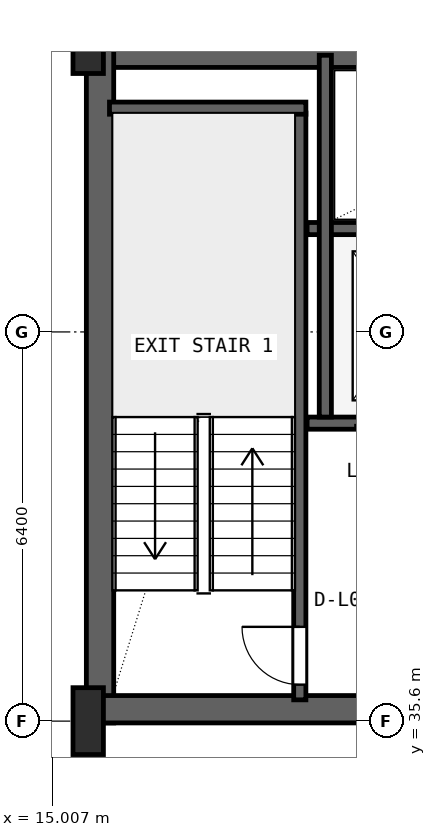
"""IFC4 building model, lengths in metres.
Left out: names, types, materials, properties, quantities, classifications, styles, units other than length and angle.
Written with IfcOpenShell. Run it as: python <this file> out.ifc"""

import sys

from ifc_helpers import new_model, si_unit, direction, frame, frame_2d, origin, origin_2d, place, context, subcontext, project, spatial, rectangle, i_section, extrude, source, transform, mapped, element, fill, save


model = new_model("IFC4")
c1 = context("Model", 3, precision=1e-05, world=origin(), true_north=direction((0.0, 1.0)))
c2 = subcontext(c1, "Body", "Model", "MODEL_VIEW")
j1 = project(units=[si_unit("LENGTHUNIT", "METRE"), si_unit("PLANEANGLEUNIT", "RADIAN")], contexts=[c1])
p1 = place(None, origin())
s1 = spatial("IfcSite", under=j1, at=p1, CompositionType="ELEMENT")
p2 = place(p1, origin())
s2 = spatial("IfcBuilding", under=s1, at=p2, CompositionType="ELEMENT")
p3 = place(p2, frame((0.0, 0.0, 43.2)))
s3 = spatial("IfcBuildingStorey", under=s2, at=p3, CompositionType="ELEMENT", Elevation=43.2)
p4 = place(p3, frame((15.6, 46.575, 0.0), z_axis=(0.0, 0.0, 1.0), x_axis=(1.0, 0.0, 0.0)))
e1 = element("IfcWall", 1, at=p4, inside=s3, PredefinedType="SHEAR", context=c2, shape_type="SweptSolid", body=[
    extrude(rectangle(XDim=36.8, YDim=0.45, at=frame_2d((18.4, 0.0))), origin(), (0.0, 0.0, 1.0), 3.65),
])
p5 = place(p3, frame((15.795, 35.57, 0.0), z_axis=(0.0, 0.0, 1.0), x_axis=(0.0, 1.0, 0.0)))
e2 = element("IfcWall", 2, at=p5, inside=s3, PredefinedType="SHEAR", context=c2, shape_type="SweptSolid", body=[
    extrude(rectangle(XDim=11.23, YDim=0.45, at=frame_2d((5.615, 0.0))), origin(), (0.0, 0.0, 1.0), 3.65),
])
p6 = place(p3, frame((15.57, 35.795, 0.0), z_axis=(0.0, 0.0, 1.0), x_axis=(1.0, 0.0, 0.0)))
e3 = element("IfcWall", 3, at=p6, inside=s3, PredefinedType="SHEAR", context=c2, shape_type="SweptSolid", body=[
    extrude(rectangle(XDim=9.23, YDim=0.45, at=frame_2d((4.615, 0.0))), origin(), (0.0, 0.0, 1.0), 3.65),
])
p7 = place(p6, frame((5.4, 0.0, 0.0)))
e4 = element("IfcOpeningElement", 4, at=p7, cuts=e3, PredefinedType="OPENING", context=c2, shape_type="SweptSolid", body=[
    extrude(rectangle(XDim=1.0, YDim=2.1, at=frame_2d((0.5, 1.05))), frame((0.0, 0.235, 0.0), z_axis=(0.0, -1.0, 0.0), x_axis=(1.0, 0.0, 0.0)), (0.0, 0.0, 1.0), 0.47),
])
m1 = source(origin(), c2, "Body", "SweptSolid", [
    extrude(i_section(OverallWidth=0.5, OverallDepth=1.1, WebThickness=0.018, FlangeThickness=0.032, FilletRadius=0.018, at=origin_2d()), origin(), (0.0, 0.0, 1.0), 3.9),
])
for number, where, z_axis, x_axis in (
    (5, (15.6, 35.6, 0.0), (0.0, 0.0, 1.0), (1.0, 0.0, 0.0)),
    (6, (15.6, 46.8, 0.0), (0.0, 0.0, 1.0), (1.0, 0.0, 0.0)),
):
    element("IfcColumn", number, at=place(p3, frame(where, z_axis=z_axis, x_axis=x_axis)), inside=s3, PredefinedType="COLUMN", context=c2, shape_type="MappedRepresentation", body=[
        mapped(m1, transform((0.0, 0.0, 0.0), x_axis=(1.0, 0.0, 0.0), y_axis=(0.0, 1.0, 0.0), z_axis=(0.0, 0.0, 1.0), scale=1.0)),
    ])
p8 = place(p3, frame((19.08, 35.95, 0.0), z_axis=(0.0, 0.0, 1.0), x_axis=(0.0, 1.0, 0.0)))
e7 = element("IfcWall", 7, at=p8, inside=s3, PredefinedType="SHEAR", context=c2, shape_type="SweptSolid", body=[
    extrude(rectangle(XDim=9.65, YDim=0.2, at=frame_2d((4.825, 0.0))), origin(), (0.0, 0.0, 1.0), 3.65),
])
p9 = place(p8, frame((0.25, 0.0, 0.0)))
e8 = element("IfcOpeningElement", 8, at=p9, cuts=e7, PredefinedType="OPENING", context=c2, shape_type="SweptSolid", body=[
    extrude(rectangle(XDim=0.95, YDim=2.1, at=frame_2d((0.475, 1.05))), frame((0.0, 0.11, 0.0), z_axis=(0.0, -1.0, 0.0), x_axis=(1.0, 0.0, 0.0)), (0.0, 0.0, 1.0), 0.22),
])
p10 = place(p3, frame((15.95, 45.68, 0.0), z_axis=(0.0, 0.0, 1.0), x_axis=(1.0, 0.0, 0.0)))
e9 = element("IfcWall", 9, at=p10, inside=s3, PredefinedType="SHEAR", context=c2, shape_type="SweptSolid", body=[
    extrude(rectangle(XDim=3.23, YDim=0.2, at=frame_2d((1.615, 0.0))), origin(), (0.0, 0.0, 1.0), 3.65),
])
p11 = place(p3, frame((19.2, 40.5, 0.0), z_axis=(0.0, 0.0, 1.0), x_axis=(1.0, 0.0, 0.0)))
e10 = element("IfcWall", 10, at=p11, inside=s3, PredefinedType="SHEAR", context=c2, shape_type="SweptSolid", body=[
    extrude(rectangle(XDim=5.52, YDim=0.2, at=frame_2d((2.76, 0.0))), origin(), (0.0, 0.0, 1.0), 3.65),
])
p12 = place(p11, frame((1.05, 0.0, 0.0)))
e11 = element("IfcOpeningElement", 11, at=p12, cuts=e10, PredefinedType="OPENING", context=c2, shape_type="SweptSolid", body=[
    extrude(rectangle(XDim=1.1, YDim=2.18, at=frame_2d((0.55, 1.09))), frame((0.0, 0.11, 0.0), z_axis=(0.0, -1.0, 0.0), x_axis=(1.0, 0.0, 0.0)), (0.0, 0.0, 1.0), 0.22),
])
p13 = place(p11, frame((3.65, 0.0, 0.0)))
e12 = element("IfcOpeningElement", 12, at=p13, cuts=e10, PredefinedType="OPENING", context=c2, shape_type="SweptSolid", body=[
    extrude(rectangle(XDim=1.1, YDim=2.18, at=frame_2d((0.55, 1.09))), frame((0.0, 0.11, 0.0), z_axis=(0.0, -1.0, 0.0), x_axis=(1.0, 0.0, 0.0)), (0.0, 0.0, 1.0), 0.22),
])
p14 = place(p3, frame((19.2, 43.7, 0.0), z_axis=(0.0, 0.0, 1.0), x_axis=(1.0, 0.0, 0.0)))
e13 = element("IfcWall", 13, at=p14, inside=s3, PredefinedType="SHEAR", context=c2, shape_type="SweptSolid", body=[
    extrude(rectangle(XDim=5.52, YDim=0.2, at=frame_2d((2.76, 0.0))), origin(), (0.0, 0.0, 1.0), 3.65),
])
p15 = place(p3, frame((19.5, 40.6, 0.0), z_axis=(0.0, 0.0, 1.0), x_axis=(0.0, 1.0, 0.0)))
e14 = element("IfcWall", 14, at=p15, inside=s3, PredefinedType="SHEAR", context=c2, shape_type="SweptSolid", body=[
    extrude(rectangle(XDim=5.95, YDim=0.2, at=frame_2d((2.975, 0.0))), origin(), (0.0, 0.0, 1.0), 3.65),
])
m2 = source(origin(), c2, "Body", "SweptSolid", [
    extrude(rectangle(XDim=0.95, YDim=2.1, at=frame_2d((0.475, 1.05))), frame((0.0, 0.025, 0.0), z_axis=(0.0, -1.0, 0.0), x_axis=(1.0, 0.0, 0.0)), (0.0, 0.0, 1.0), 0.05),
])
p16 = place(p9, origin())
e15 = element("IfcDoor", 15, at=p16, inside=s3, OperationType="SINGLE_SWING_RIGHT", PredefinedType="DOOR", context=c2, shape_type="MappedRepresentation", body=[
    mapped(m2, transform((0.0, 0.0, 0.0), x_axis=(1.0, 0.0, 0.0), y_axis=(0.0, 1.0, 0.0), z_axis=(0.0, 0.0, 1.0), scale=1.0)),
])
fill(e8, e15)
save(model, sys.argv[1])
